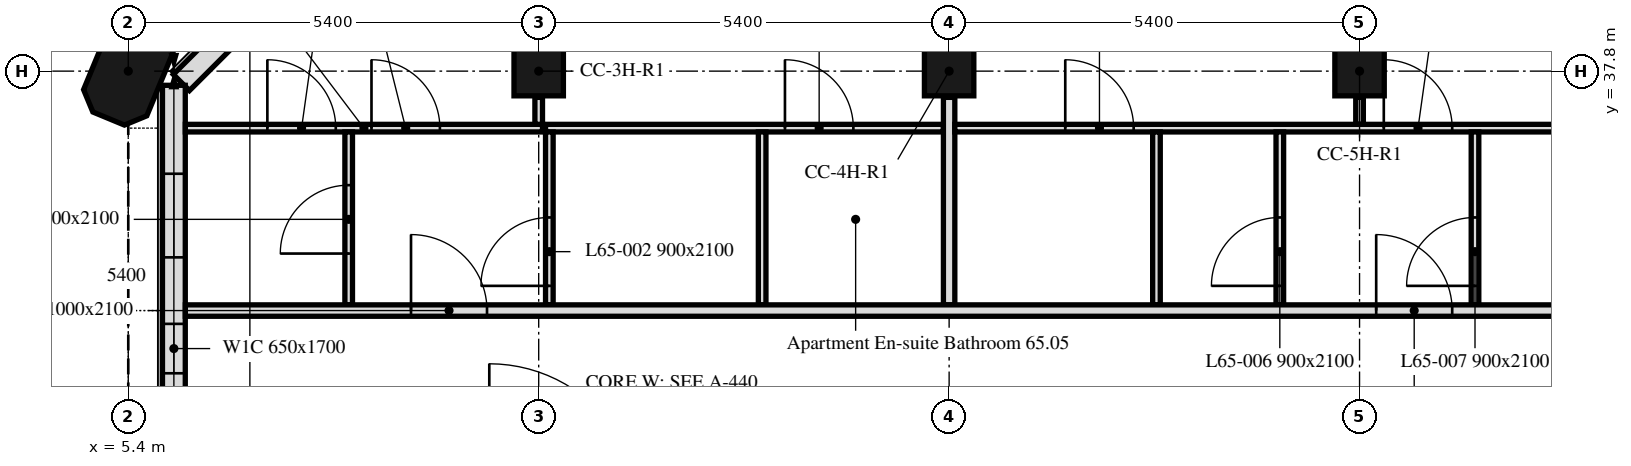
"""IFC4 building model, lengths in metres.
Left out: names, types, materials, properties, quantities, classifications, styles, units other than length and angle.
Written with IfcOpenShell. Run it as: python <this file> out.ifc"""

import sys

from ifc_helpers import new_model, si_unit, direction, frame, frame_2d, origin, origin_2d, place, context, subcontext, project, spatial, polyline, rectangle, outline, extrude, element, fill, save


model = new_model("IFC4")
c1 = context("Model", 3, precision=1e-05, world=origin(), true_north=direction((0.0, 1.0)))
c2 = subcontext(c1, "Body", "Model", "MODEL_VIEW")
j1 = project(units=[si_unit("LENGTHUNIT", "METRE"), si_unit("PLANEANGLEUNIT", "RADIAN")], contexts=[c1])
p1 = place(None, origin())
s1 = spatial("IfcSite", under=j1, at=p1, CompositionType="ELEMENT")
p2 = place(p1, origin())
s2 = spatial("IfcBuilding", under=s1, at=p2, CompositionType="ELEMENT")
p3 = place(p2, frame((0.0, 0.0, 268.6)))
s3 = spatial("IfcBuildingStorey", under=s2, at=p3, CompositionType="ELEMENT", Elevation=268.6)
p4 = place(p3, frame((5.4, 37.8, 0.0), z_axis=(0.0, 0.0, 1.0), x_axis=(0.382683432365, 0.923879532511, 0.0)))
e1 = element("IfcColumn", 1, at=p4, inside=s3, PredefinedType="COLUMN", context=c2, shape_type="SweptSolid", body=[
    extrude(outline(polyline([(-0.45, -0.45), (0.45, -0.45), (0.675, -0.225), (0.675, 0.225), (0.45, 0.45), (-0.45, 0.45), (-0.675, 0.225), (-0.675, -0.225), (-0.45, -0.45)])), origin(), (0.0, 0.0, 1.0), 3.0),
])
for number, where, z_axis, x_axis in (
    (2, (10.8, 37.8, 0.0), (0.0, 0.0, 1.0), (1.0, 0.0, 0.0)),
    (3, (16.2, 37.8, 0.0), (0.0, 0.0, 1.0), (1.0, 0.0, 0.0)),
    (4, (21.6, 37.8, 0.0), (0.0, 0.0, 1.0), (1.0, 0.0, 0.0)),
):
    element("IfcColumn", number, at=place(p3, frame(where, z_axis=z_axis, x_axis=x_axis)), inside=s3, PredefinedType="COLUMN", context=c2, shape_type="SweptSolid", body=[
        extrude(rectangle(XDim=0.65, YDim=0.65, at=origin_2d()), origin(), (0.0, 0.0, 1.0), 3.0),
    ])
p5 = place(p3, frame((10.949, 42.501, 0.0), z_axis=(0.0, 0.0, 1.0), x_axis=(-0.707106781187, -0.707106781187, 0.0)))
e5 = element("IfcWall", 5, at=p5, inside=s3, PredefinedType="SOLIDWALL", context=c2, shape_type="SweptSolid", body=[
    extrude(rectangle(XDim=6.86, YDim=0.3, at=frame_2d((3.43, 0.0))), origin(), (0.0, 0.0, 1.0), 3.0),
])
p6 = place(p5, frame((1.28, 0.0, 0.9)))
e6 = element("IfcOpeningElement", 6, at=p6, cuts=e5, PredefinedType="OPENING", context=c2, shape_type="SweptSolid", body=[
    extrude(rectangle(XDim=1.1, YDim=1.7, at=frame_2d((0.55, 0.85))), frame((0.0, 0.16, 0.0), z_axis=(0.0, -1.0, 0.0), x_axis=(1.0, 0.0, 0.0)), (0.0, 0.0, 1.0), 0.32),
])
p7 = place(p5, frame((4.48, 0.0, 0.9)))
e7 = element("IfcOpeningElement", 7, at=p7, cuts=e5, PredefinedType="OPENING", context=c2, shape_type="SweptSolid", body=[
    extrude(rectangle(XDim=1.1, YDim=1.7, at=frame_2d((0.55, 0.85))), frame((0.0, 0.16, 0.0), z_axis=(0.0, -1.0, 0.0), x_axis=(1.0, 0.0, 0.0)), (0.0, 0.0, 1.0), 0.32),
])
p8 = place(p3, frame((6.0, 37.614, 0.0), z_axis=(0.0, 0.0, 1.0), x_axis=(0.0, -1.0, 0.0)))
e8 = element("IfcWall", 8, at=p8, inside=s3, PredefinedType="SOLIDWALL", context=c2, shape_type="SweptSolid", body=[
    extrude(rectangle(XDim=5.214, YDim=0.3, at=frame_2d((2.607, 0.0))), origin(), (0.0, 0.0, 1.0), 3.0),
])
p9 = place(p8, frame((1.164, 0.0, 0.9)))
e9 = element("IfcOpeningElement", 9, at=p9, cuts=e8, PredefinedType="OPENING", context=c2, shape_type="SweptSolid", body=[
    extrude(rectangle(XDim=1.1, YDim=1.7, at=frame_2d((0.55, 0.85))), frame((0.0, 0.16, 0.0), z_axis=(0.0, -1.0, 0.0), x_axis=(1.0, 0.0, 0.0)), (0.0, 0.0, 1.0), 0.32),
])
p10 = place(p8, frame((3.139, 0.0, 0.9)))
e10 = element("IfcOpeningElement", 10, at=p10, cuts=e8, PredefinedType="OPENING", context=c2, shape_type="SweptSolid", body=[
    extrude(rectangle(XDim=0.65, YDim=1.7, at=frame_2d((0.325, 0.85))), frame((0.0, 0.16, 0.0), z_axis=(0.0, -1.0, 0.0), x_axis=(1.0, 0.0, 0.0)), (0.0, 0.0, 1.0), 0.32),
])
p11 = place(p3, frame((6.151, 37.05, 0.0), z_axis=(0.0, 0.0, 1.0), x_axis=(1.0, 0.0, 0.0)))
e11 = element("IfcWall", 11, at=p11, inside=s3, PredefinedType="PARTITIONING", context=c2, shape_type="SweptSolid", body=[
    extrude(rectangle(XDim=4.699, YDim=0.1, at=frame_2d((2.35, 0.0))), origin(), (0.0, 0.0, 1.0), 3.0),
])
p12 = place(p11, frame((1.079, 0.0, 0.0)))
e12 = element("IfcOpeningElement", 12, at=p12, cuts=e11, PredefinedType="OPENING", context=c2, shape_type="SweptSolid", body=[
    extrude(rectangle(XDim=0.9, YDim=2.1, at=frame_2d((0.45, 1.05))), frame((0.0, 0.05, 0.0), z_axis=(0.0, -1.0, 0.0), x_axis=(1.0, 0.0, 0.0)), (0.0, 0.0, 1.0), 0.1),
])
p13 = place(p11, frame((2.449, 0.0, 0.0)))
e13 = element("IfcOpeningElement", 13, at=p13, cuts=e11, PredefinedType="OPENING", context=c2, shape_type="SweptSolid", body=[
    extrude(rectangle(XDim=0.9, YDim=2.1, at=frame_2d((0.45, 1.05))), frame((0.0, 0.05, 0.0), z_axis=(0.0, -1.0, 0.0), x_axis=(1.0, 0.0, 0.0)), (0.0, 0.0, 1.0), 0.1),
])
p14 = place(p3, frame((10.8, 37.1, 0.0), z_axis=(0.0, 0.0, 1.0), x_axis=(0.0, 1.0, 0.0)))
e14 = element("IfcWall", 14, at=p14, inside=s3, PredefinedType="PARTITIONING", context=c2, shape_type="SweptSolid", body=[
    extrude(rectangle(XDim=0.355, YDim=0.1, at=frame_2d((0.177, 0.0))), origin(), (0.0, 0.0, 1.0), 3.0),
])
p15 = place(p3, frame((10.89, 37.05, 0.0), z_axis=(0.0, 0.0, 1.0), x_axis=(1.0, 0.0, 0.0)))
e15 = element("IfcWall", 15, at=p15, inside=s3, PredefinedType="PARTITIONING", context=c2, shape_type="SweptSolid", body=[
    extrude(rectangle(XDim=5.235, YDim=0.1, at=frame_2d((2.618, 0.0))), origin(), (0.0, 0.0, 1.0), 3.0),
])
p16 = place(p15, frame((3.15, 0.0, 0.0)))
e16 = element("IfcOpeningElement", 16, at=p16, cuts=e15, PredefinedType="OPENING", context=c2, shape_type="SweptSolid", body=[
    extrude(rectangle(XDim=0.9, YDim=2.1, at=frame_2d((0.45, 1.05))), frame((0.0, 0.05, 0.0), z_axis=(0.0, -1.0, 0.0), x_axis=(1.0, 0.0, 0.0)), (0.0, 0.0, 1.0), 0.1),
])
p17 = place(p3, frame((8.3, 34.725, 0.0), z_axis=(0.0, 0.0, 1.0), x_axis=(0.0, 1.0, 0.0)))
e17 = element("IfcWall", 17, at=p17, inside=s3, PredefinedType="PARTITIONING", context=c2, shape_type="SweptSolid", body=[
    extrude(rectangle(XDim=2.275, YDim=0.1, at=frame_2d((1.137, 0.0))), origin(), (0.0, 0.0, 1.0), 3.0),
])
p18 = place(p17, frame((0.675, 0.0, 0.0)))
e18 = element("IfcOpeningElement", 18, at=p18, cuts=e17, PredefinedType="OPENING", context=c2, shape_type="SweptSolid", body=[
    extrude(rectangle(XDim=0.9, YDim=2.1, at=frame_2d((0.45, 1.05))), frame((0.0, 0.05, 0.0), z_axis=(0.0, -1.0, 0.0), x_axis=(1.0, 0.0, 0.0)), (0.0, 0.0, 1.0), 0.1),
])
p19 = place(p3, frame((10.94, 34.725, 0.0), z_axis=(0.0, 0.0, 1.0), x_axis=(0.0, 1.0, 0.0)))
e19 = element("IfcWall", 19, at=p19, inside=s3, PredefinedType="PARTITIONING", context=c2, shape_type="SweptSolid", body=[
    extrude(rectangle(XDim=2.275, YDim=0.1, at=frame_2d((1.137, 0.0))), origin(), (0.0, 0.0, 1.0), 3.0),
])
p20 = place(p19, frame((0.25, 0.0, 0.0)))
e20 = element("IfcOpeningElement", 20, at=p20, cuts=e19, PredefinedType="OPENING", context=c2, shape_type="SweptSolid", body=[
    extrude(rectangle(XDim=0.9, YDim=2.1, at=frame_2d((0.45, 1.05))), frame((0.0, 0.05, 0.0), z_axis=(0.0, -1.0, 0.0), x_axis=(1.0, 0.0, 0.0)), (0.0, 0.0, 1.0), 0.1),
])
p21 = place(p3, frame((13.74, 34.725, 0.0), z_axis=(0.0, 0.0, 1.0), x_axis=(0.0, 1.0, 0.0)))
e21 = element("IfcWall", 21, at=p21, inside=s3, PredefinedType="PARTITIONING", context=c2, shape_type="SweptSolid", body=[
    extrude(rectangle(XDim=2.275, YDim=0.1, at=frame_2d((1.137, 0.0))), origin(), (0.0, 0.0, 1.0), 3.0),
])
p22 = place(p3, frame((16.2, 34.725, 0.0), z_axis=(0.0, 0.0, 1.0), x_axis=(0.0, 1.0, 0.0)))
e22 = element("IfcWall", 22, at=p22, inside=s3, PredefinedType="PARTITIONING", context=c2, shape_type="SweptSolid", body=[
    extrude(rectangle(XDim=2.73, YDim=0.15, at=frame_2d((1.365, 0.0))), origin(), (0.0, 0.0, 1.0), 3.0),
])
p23 = place(p3, frame((21.6, 37.1, 0.0), z_axis=(0.0, 0.0, 1.0), x_axis=(0.0, 1.0, 0.0)))
e23 = element("IfcWall", 23, at=p23, inside=s3, PredefinedType="PARTITIONING", context=c2, shape_type="SweptSolid", body=[
    extrude(rectangle(XDim=0.355, YDim=0.1, at=frame_2d((0.177, 0.0))), origin(), (0.0, 0.0, 1.0), 3.0),
])
p24 = place(p3, frame((16.275, 37.05, 0.0), z_axis=(0.0, 0.0, 1.0), x_axis=(1.0, 0.0, 0.0)))
e24 = element("IfcWall", 24, at=p24, inside=s3, PredefinedType="PARTITIONING", context=c2, shape_type="SweptSolid", body=[
    extrude(rectangle(XDim=16.05, YDim=0.1, at=frame_2d((8.025, 0.0))), origin(), (0.0, 0.0, 1.0), 3.0),
])
p25 = place(p24, frame((1.453, 0.0, 0.0)))
e25 = element("IfcOpeningElement", 25, at=p25, cuts=e24, PredefinedType="OPENING", context=c2, shape_type="SweptSolid", body=[
    extrude(rectangle(XDim=0.9, YDim=2.1, at=frame_2d((0.45, 1.05))), frame((0.0, 0.05, 0.0), z_axis=(0.0, -1.0, 0.0), x_axis=(1.0, 0.0, 0.0)), (0.0, 0.0, 1.0), 0.1),
])
p26 = place(p24, frame((12.125, 0.0, 0.0)))
e26 = element("IfcOpeningElement", 26, at=p26, cuts=e24, PredefinedType="OPENING", context=c2, shape_type="SweptSolid", body=[
    extrude(rectangle(XDim=0.9, YDim=2.1, at=frame_2d((0.45, 1.05))), frame((0.0, 0.05, 0.0), z_axis=(0.0, -1.0, 0.0), x_axis=(1.0, 0.0, 0.0)), (0.0, 0.0, 1.0), 0.1),
])
p27 = place(p24, frame((13.625, 0.0, 0.0)))
e27 = element("IfcOpeningElement", 27, at=p27, cuts=e24, PredefinedType="OPENING", context=c2, shape_type="SweptSolid", body=[
    extrude(rectangle(XDim=0.9, YDim=2.1, at=frame_2d((0.45, 1.05))), frame((0.0, 0.05, 0.0), z_axis=(0.0, -1.0, 0.0), x_axis=(1.0, 0.0, 0.0)), (0.0, 0.0, 1.0), 0.1),
])
p28 = place(p24, frame((5.644, 0.0, 0.0)))
e28 = element("IfcOpeningElement", 28, at=p28, cuts=e24, PredefinedType="OPENING", context=c2, shape_type="SweptSolid", body=[
    extrude(rectangle(XDim=0.9, YDim=2.1, at=frame_2d((0.45, 1.05))), frame((0.0, 0.05, 0.0), z_axis=(0.0, -1.0, 0.0), x_axis=(1.0, 0.0, 0.0)), (0.0, 0.0, 1.0), 0.1),
])
p29 = place(p3, frame((18.928, 34.725, 0.0), z_axis=(0.0, 0.0, 1.0), x_axis=(0.0, 1.0, 0.0)))
e29 = element("IfcWall", 29, at=p29, inside=s3, PredefinedType="PARTITIONING", context=c2, shape_type="SweptSolid", body=[
    extrude(rectangle(XDim=2.275, YDim=0.1, at=frame_2d((1.137, 0.0))), origin(), (0.0, 0.0, 1.0), 3.0),
])
p30 = place(p3, frame((20.551, 34.725, 0.0), z_axis=(0.0, 0.0, 1.0), x_axis=(0.0, 1.0, 0.0)))
e30 = element("IfcWall", 30, at=p30, inside=s3, PredefinedType="PARTITIONING", context=c2, shape_type="SweptSolid", body=[
    extrude(rectangle(XDim=2.275, YDim=0.1, at=frame_2d((1.137, 0.0))), origin(), (0.0, 0.0, 1.0), 3.0),
])
p31 = place(p30, frame((0.25, 0.0, 0.0)))
e31 = element("IfcOpeningElement", 31, at=p31, cuts=e30, PredefinedType="OPENING", context=c2, shape_type="SweptSolid", body=[
    extrude(rectangle(XDim=0.9, YDim=2.1, at=frame_2d((0.45, 1.05))), frame((0.0, 0.05, 0.0), z_axis=(0.0, -1.0, 0.0), x_axis=(1.0, 0.0, 0.0)), (0.0, 0.0, 1.0), 0.1),
])
p32 = place(p3, frame((23.119, 34.725, 0.0), z_axis=(0.0, 0.0, 1.0), x_axis=(0.0, 1.0, 0.0)))
e32 = element("IfcWall", 32, at=p32, inside=s3, PredefinedType="PARTITIONING", context=c2, shape_type="SweptSolid", body=[
    extrude(rectangle(XDim=2.275, YDim=0.1, at=frame_2d((1.137, 0.0))), origin(), (0.0, 0.0, 1.0), 3.0),
])
p33 = place(p32, frame((0.25, 0.0, 0.0)))
e33 = element("IfcOpeningElement", 33, at=p33, cuts=e32, PredefinedType="OPENING", context=c2, shape_type="SweptSolid", body=[
    extrude(rectangle(XDim=0.9, YDim=2.1, at=frame_2d((0.45, 1.05))), frame((0.0, 0.05, 0.0), z_axis=(0.0, -1.0, 0.0), x_axis=(1.0, 0.0, 0.0)), (0.0, 0.0, 1.0), 0.1),
])
p34 = place(p3, frame((6.151, 34.65, 0.0), z_axis=(0.0, 0.0, 1.0), x_axis=(1.0, 0.0, 0.0)))
e34 = element("IfcWall", 34, at=p34, inside=s3, PredefinedType="PARTITIONING", context=c2, shape_type="SweptSolid", body=[
    extrude(rectangle(XDim=41.698, YDim=0.15, at=frame_2d((20.849, 0.0))), origin(), (0.0, 0.0, 1.0), 3.0),
])
p35 = place(p34, frame((2.969, 0.0, 0.0)))
e35 = element("IfcOpeningElement", 35, at=p35, cuts=e34, PredefinedType="OPENING", context=c2, shape_type="SweptSolid", body=[
    extrude(rectangle(XDim=1.0, YDim=2.1, at=frame_2d((0.5, 1.05))), frame((0.0, 0.075, 0.0), z_axis=(0.0, -1.0, 0.0), x_axis=(1.0, 0.0, 0.0)), (0.0, 0.0, 1.0), 0.15),
])
p36 = place(p34, frame((15.668, 0.0, 0.0)))
e36 = element("IfcOpeningElement", 36, at=p36, cuts=e34, PredefinedType="OPENING", context=c2, shape_type="SweptSolid", body=[
    extrude(rectangle(XDim=1.0, YDim=2.1, at=frame_2d((0.5, 1.05))), frame((0.0, 0.075, 0.0), z_axis=(0.0, -1.0, 0.0), x_axis=(1.0, 0.0, 0.0)), (0.0, 0.0, 1.0), 0.15),
])
p37 = place(p34, frame((32.054, 0.0, 0.0)))
e37 = element("IfcOpeningElement", 37, at=p37, cuts=e34, PredefinedType="OPENING", context=c2, shape_type="SweptSolid", body=[
    extrude(rectangle(XDim=1.0, YDim=2.1, at=frame_2d((0.5, 1.05))), frame((0.0, 0.075, 0.0), z_axis=(0.0, -1.0, 0.0), x_axis=(1.0, 0.0, 0.0)), (0.0, 0.0, 1.0), 0.15),
])
p38 = place(p9, origin())
e38 = element("IfcWindow", 38, at=p38, inside=s3, PartitioningType="SINGLE_PANEL", PredefinedType="WINDOW", context=c2, shape_type="SweptSolid", body=[
    extrude(rectangle(XDim=1.1, YDim=1.7, at=frame_2d((0.55, 0.85))), frame((0.0, 0.03, 0.0), z_axis=(0.0, -1.0, 0.0), x_axis=(1.0, 0.0, 0.0)), (0.0, 0.0, 1.0), 0.06),
])
fill(e9, e38)
p39 = place(p10, origin())
e39 = element("IfcWindow", 39, at=p39, inside=s3, PartitioningType="SINGLE_PANEL", PredefinedType="WINDOW", context=c2, shape_type="SweptSolid", body=[
    extrude(rectangle(XDim=0.65, YDim=1.7, at=frame_2d((0.325, 0.85))), frame((0.0, 0.03, 0.0), z_axis=(0.0, -1.0, 0.0), x_axis=(1.0, 0.0, 0.0)), (0.0, 0.0, 1.0), 0.06),
])
fill(e10, e39)
p40 = place(p16, origin())
e40 = element("IfcDoor", 40, at=p40, inside=s3, OperationType="SINGLE_SWING_RIGHT", PredefinedType="DOOR", context=c2, shape_type="SweptSolid", body=[
    extrude(rectangle(XDim=0.9, YDim=2.1, at=frame_2d((0.45, 1.05))), frame((0.0, 0.025, 0.0), z_axis=(0.0, -1.0, 0.0), x_axis=(1.0, 0.0, 0.0)), (0.0, 0.0, 1.0), 0.05),
])
fill(e16, e40)
p41 = place(p20, origin())
e41 = element("IfcDoor", 41, at=p41, inside=s3, OperationType="SINGLE_SWING_LEFT", PredefinedType="DOOR", context=c2, shape_type="SweptSolid", body=[
    extrude(rectangle(XDim=0.9, YDim=2.1, at=frame_2d((0.45, 1.05))), frame((0.0, 0.025, 0.0), z_axis=(0.0, -1.0, 0.0), x_axis=(1.0, 0.0, 0.0)), (0.0, 0.0, 1.0), 0.05),
])
fill(e20, e41)
p42 = place(p25, origin())
e42 = element("IfcDoor", 42, at=p42, inside=s3, OperationType="SINGLE_SWING_LEFT", PredefinedType="DOOR", context=c2, shape_type="SweptSolid", body=[
    extrude(rectangle(XDim=0.9, YDim=2.1, at=frame_2d((0.45, 1.05))), frame((0.0, 0.025, 0.0), z_axis=(0.0, -1.0, 0.0), x_axis=(1.0, 0.0, 0.0)), (0.0, 0.0, 1.0), 0.05),
])
fill(e25, e42)
p43 = place(p31, origin())
e43 = element("IfcDoor", 43, at=p43, inside=s3, OperationType="SINGLE_SWING_RIGHT", PredefinedType="DOOR", context=c2, shape_type="SweptSolid", body=[
    extrude(rectangle(XDim=0.9, YDim=2.1, at=frame_2d((0.45, 1.05))), frame((0.0, 0.025, 0.0), z_axis=(0.0, -1.0, 0.0), x_axis=(1.0, 0.0, 0.0)), (0.0, 0.0, 1.0), 0.05),
])
fill(e31, e43)
p44 = place(p33, origin())
e44 = element("IfcDoor", 44, at=p44, inside=s3, OperationType="SINGLE_SWING_LEFT", PredefinedType="DOOR", context=c2, shape_type="SweptSolid", body=[
    extrude(rectangle(XDim=0.9, YDim=2.1, at=frame_2d((0.45, 1.05))), frame((0.0, 0.025, 0.0), z_axis=(0.0, -1.0, 0.0), x_axis=(1.0, 0.0, 0.0)), (0.0, 0.0, 1.0), 0.05),
])
fill(e33, e44)
p45 = place(p12, origin())
e45 = element("IfcDoor", 45, at=p45, inside=s3, OperationType="SINGLE_SWING_LEFT", PredefinedType="DOOR", context=c2, shape_type="SweptSolid", body=[
    extrude(rectangle(XDim=0.9, YDim=2.1, at=frame_2d((0.45, 1.05))), frame((0.0, 0.025, 0.0), z_axis=(0.0, -1.0, 0.0), x_axis=(1.0, 0.0, 0.0)), (0.0, 0.0, 1.0), 0.05),
])
fill(e12, e45)
p46 = place(p18, origin())
e46 = element("IfcDoor", 46, at=p46, inside=s3, OperationType="SINGLE_SWING_LEFT", PredefinedType="DOOR", context=c2, shape_type="SweptSolid", body=[
    extrude(rectangle(XDim=0.9, YDim=2.1, at=frame_2d((0.45, 1.05))), frame((0.0, 0.025, 0.0), z_axis=(0.0, -1.0, 0.0), x_axis=(1.0, 0.0, 0.0)), (0.0, 0.0, 1.0), 0.05),
])
fill(e18, e46)
p47 = place(p13, origin())
e47 = element("IfcDoor", 47, at=p47, inside=s3, OperationType="SINGLE_SWING_RIGHT", PredefinedType="DOOR", context=c2, shape_type="SweptSolid", body=[
    extrude(rectangle(XDim=0.9, YDim=2.1, at=frame_2d((0.45, 1.05))), frame((0.0, 0.025, 0.0), z_axis=(0.0, -1.0, 0.0), x_axis=(1.0, 0.0, 0.0)), (0.0, 0.0, 1.0), 0.05),
])
fill(e13, e47)
p48 = place(p28, origin())
e48 = element("IfcDoor", 48, at=p48, inside=s3, OperationType="SINGLE_SWING_RIGHT", PredefinedType="DOOR", context=c2, shape_type="SweptSolid", body=[
    extrude(rectangle(XDim=0.9, YDim=2.1, at=frame_2d((0.45, 1.05))), frame((0.0, 0.025, 0.0), z_axis=(0.0, -1.0, 0.0), x_axis=(1.0, 0.0, 0.0)), (0.0, 0.0, 1.0), 0.05),
])
fill(e28, e48)
p49 = place(p35, origin())
e49 = element("IfcDoor", 49, at=p49, inside=s3, OperationType="SINGLE_SWING_RIGHT", PredefinedType="DOOR", context=c2, shape_type="SweptSolid", body=[
    extrude(rectangle(XDim=1.0, YDim=2.1, at=frame_2d((0.5, 1.05))), frame((0.0, 0.025, 0.0), z_axis=(0.0, -1.0, 0.0), x_axis=(1.0, 0.0, 0.0)), (0.0, 0.0, 1.0), 0.05),
])
fill(e35, e49)
p50 = place(p36, origin())
e50 = element("IfcDoor", 50, at=p50, inside=s3, OperationType="SINGLE_SWING_LEFT", PredefinedType="DOOR", context=c2, shape_type="SweptSolid", body=[
    extrude(rectangle(XDim=1.0, YDim=2.1, at=frame_2d((0.5, 1.05))), frame((0.0, 0.025, 0.0), z_axis=(0.0, -1.0, 0.0), x_axis=(1.0, 0.0, 0.0)), (0.0, 0.0, 1.0), 0.05),
])
fill(e36, e50)
save(model, sys.argv[1])
